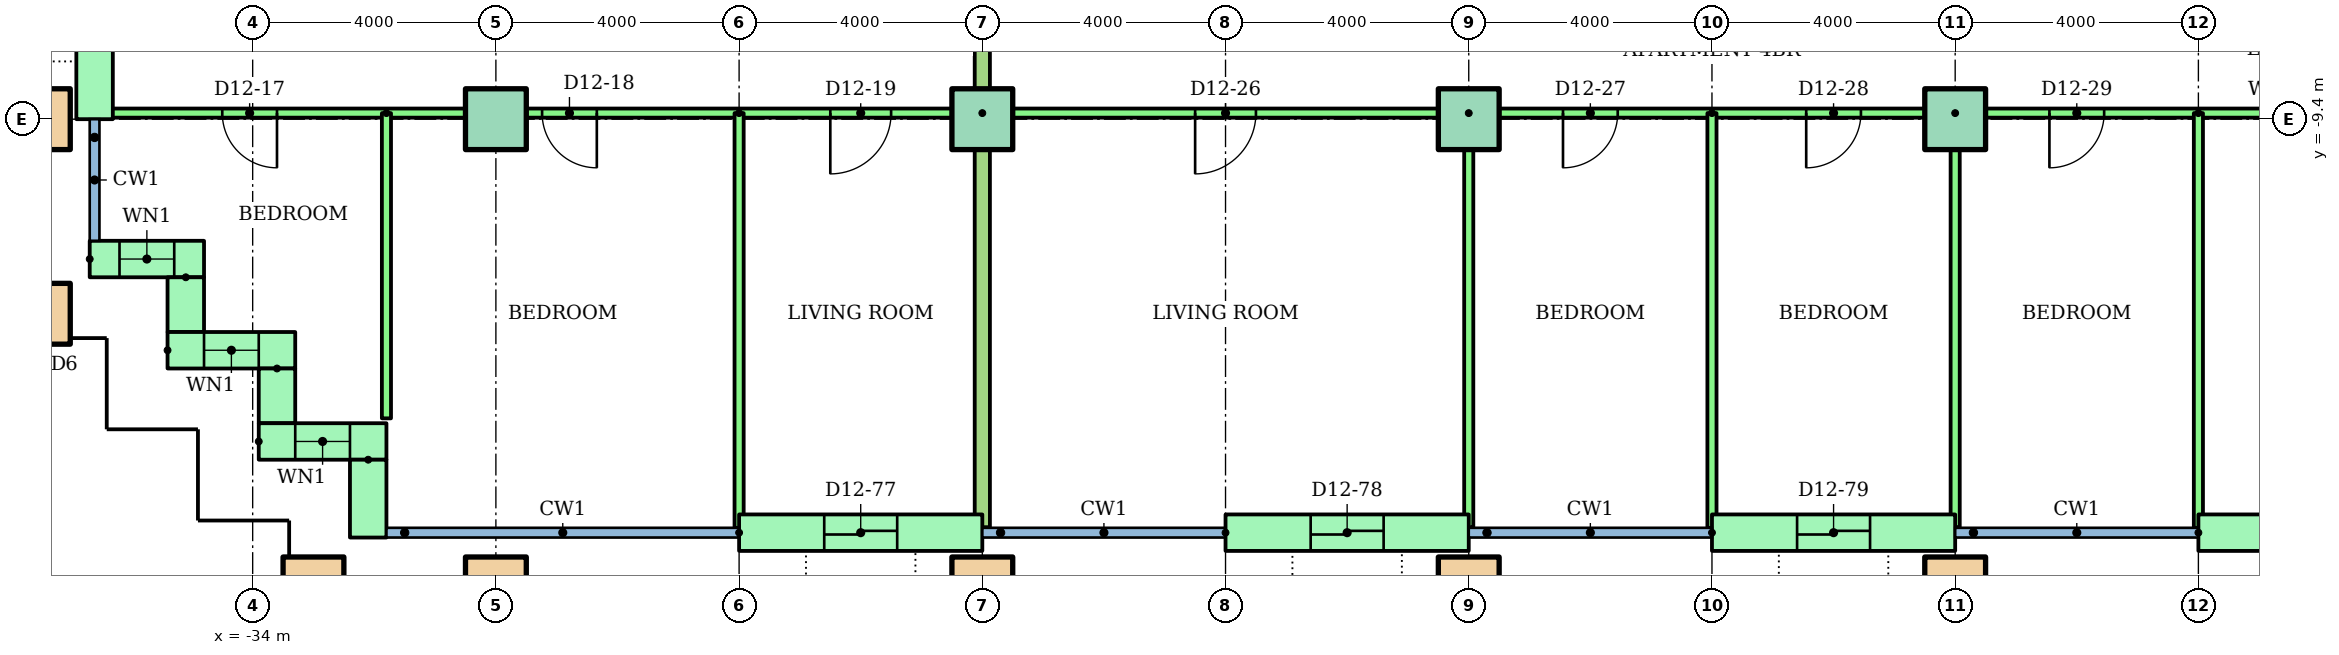
"""IFC4 building model, lengths in metres.
Left out: names, types, materials, properties, quantities, classifications, styles, units other than length and angle.
Written with IfcOpenShell. Run it as: python <this file> out.ifc"""

import sys

from ifc_helpers import new_model, si_unit, direction, frame, frame_2d, origin, origin_2d, place, context, subcontext, project, spatial, rectangle, hollow_rectangle, extrude, element, fill, save


model = new_model("IFC4")
c1 = context("Model", 3, precision=1e-05, world=origin(), true_north=direction((0.0, 1.0)))
c2 = subcontext(c1, "Body", "Model", "MODEL_VIEW")
j1 = project(units=[si_unit("LENGTHUNIT", "METRE"), si_unit("PLANEANGLEUNIT", "RADIAN")], contexts=[c1])
p1 = place(None, origin())
s1 = spatial("IfcSite", under=j1, at=p1, CompositionType="ELEMENT")
p2 = place(p1, origin())
s2 = spatial("IfcBuilding", under=s1, at=p2, CompositionType="ELEMENT")
p3 = place(p2, frame((0.0, 0.0, 48.0)))
s3 = spatial("IfcBuildingStorey", under=s2, at=p3, CompositionType="ELEMENT", Elevation=48.0)
for number, where in (
    (1, (-33.0, -17.1, 0.0)),
    (2, (-30.0, -17.1, 0.0)),
    (3, (-22.0, -17.1, 0.0)),
    (4, (-14.0, -17.1, 0.0)),
    (5, (-6.0, -17.1, 0.0)),
    (6, (-37.5, -12.6, 0.0)),
    (7, (-37.5, -9.4, 0.0)),
):
    element("IfcColumn", number, at=place(p3, frame(where)), inside=s3, PredefinedType="COLUMN", context=c2, shape_type="SweptSolid", body=[
        extrude(hollow_rectangle(XDim=1.0, YDim=1.0, WallThickness=0.05, at=origin_2d()), origin(), (0.0, 0.0, 1.0), 3.2),
    ])
for number, where in (
    (8, (-30.0, -9.4, 0.0)),
    (9, (-22.0, -9.4, 0.0)),
    (10, (-14.0, -9.4, 0.0)),
    (11, (-6.0, -9.4, 0.0)),
):
    element("IfcColumn", number, at=place(p3, frame(where)), inside=s3, PredefinedType="COLUMN", context=c2, shape_type="SweptSolid", body=[
        extrude(rectangle(XDim=1.0, YDim=1.0, at=origin_2d()), origin(), (0.0, 0.0, 1.0), 3.2),
    ])
p4 = place(p3, frame((-36.6, -5.7, 0.0), z_axis=(0.0, 0.0, 1.0), x_axis=(0.0, -1.0, 0.0)))
e12 = element("IfcWall", 12, at=p4, inside=s3, PredefinedType="STANDARD", context=c2, shape_type="SweptSolid", body=[
    extrude(rectangle(XDim=3.7, YDim=0.6, at=frame_2d((1.85, 0.0))), origin(), (0.0, 0.0, 1.0), 2.92),
])
p5 = place(p4, frame((0.725, 0.0, 0.0)))
e13 = element("IfcOpeningElement", 13, at=p5, cuts=e12, PredefinedType="OPENING", context=c2, shape_type="SweptSolid", body=[
    extrude(rectangle(XDim=1.2, YDim=2.1, at=frame_2d((0.6, 1.05))), frame((0.0, 0.31, 0.0), z_axis=(0.0, -1.0, 0.0), x_axis=(1.0, 0.0, 0.0)), (0.0, 0.0, 1.0), 0.62),
])
p6 = place(p3, frame((-36.68, -11.7, 0.0)))
e14 = element("IfcWall", 14, at=p6, inside=s3, PredefinedType="STANDARD", context=c2, shape_type="SweptSolid", body=[
    extrude(rectangle(XDim=1.88, YDim=0.6, at=frame_2d((0.94, 0.0))), origin(), (0.0, 0.0, 1.0), 2.92),
])
p7 = place(p6, frame((0.49, 0.0, 0.9)))
e15 = element("IfcOpeningElement", 15, at=p7, cuts=e14, PredefinedType="OPENING", context=c2, shape_type="SweptSolid", body=[
    extrude(rectangle(XDim=0.9, YDim=1.5, at=frame_2d((0.45, 0.75))), frame((0.0, 0.31, 0.0), z_axis=(0.0, -1.0, 0.0), x_axis=(1.0, 0.0, 0.0)), (0.0, 0.0, 1.0), 0.62),
])
p8 = place(p3, frame((-35.1, -12.0, 0.0), z_axis=(0.0, 0.0, 1.0), x_axis=(0.0, -1.0, 0.0)))
e16 = element("IfcWall", 16, at=p8, inside=s3, PredefinedType="STANDARD", context=c2, shape_type="SweptSolid", body=[
    extrude(rectangle(XDim=0.9, YDim=0.6, at=frame_2d((0.45, 0.0))), origin(), (0.0, 0.0, 1.0), 2.92),
])
p9 = place(p3, frame((-35.4, -13.2, 0.0)))
e17 = element("IfcWall", 17, at=p9, inside=s3, PredefinedType="STANDARD", context=c2, shape_type="SweptSolid", body=[
    extrude(rectangle(XDim=2.1, YDim=0.6, at=frame_2d((1.05, 0.0))), origin(), (0.0, 0.0, 1.0), 2.92),
])
p10 = place(p9, frame((0.6, 0.0, 0.9)))
e18 = element("IfcOpeningElement", 18, at=p10, cuts=e17, PredefinedType="OPENING", context=c2, shape_type="SweptSolid", body=[
    extrude(rectangle(XDim=0.9, YDim=1.5, at=frame_2d((0.45, 0.75))), frame((0.0, 0.31, 0.0), z_axis=(0.0, -1.0, 0.0), x_axis=(1.0, 0.0, 0.0)), (0.0, 0.0, 1.0), 0.62),
])
p11 = place(p3, frame((-33.6, -13.5, 0.0), z_axis=(0.0, 0.0, 1.0), x_axis=(0.0, -1.0, 0.0)))
e19 = element("IfcWall", 19, at=p11, inside=s3, PredefinedType="STANDARD", context=c2, shape_type="SweptSolid", body=[
    extrude(rectangle(XDim=0.9, YDim=0.6, at=frame_2d((0.45, 0.0))), origin(), (0.0, 0.0, 1.0), 2.92),
])
p12 = place(p3, frame((-33.9, -14.7, 0.0)))
e20 = element("IfcWall", 20, at=p12, inside=s3, PredefinedType="STANDARD", context=c2, shape_type="SweptSolid", body=[
    extrude(rectangle(XDim=2.1, YDim=0.6, at=frame_2d((1.05, 0.0))), origin(), (0.0, 0.0, 1.0), 2.92),
])
p13 = place(p12, frame((0.6, 0.0, 0.9)))
e21 = element("IfcOpeningElement", 21, at=p13, cuts=e20, PredefinedType="OPENING", context=c2, shape_type="SweptSolid", body=[
    extrude(rectangle(XDim=0.9, YDim=1.5, at=frame_2d((0.45, 0.75))), frame((0.0, 0.31, 0.0), z_axis=(0.0, -1.0, 0.0), x_axis=(1.0, 0.0, 0.0)), (0.0, 0.0, 1.0), 0.62),
])
p14 = place(p3, frame((-32.1, -15.0, 0.0), z_axis=(0.0, 0.0, 1.0), x_axis=(0.0, -1.0, 0.0)))
e22 = element("IfcWall", 22, at=p14, inside=s3, PredefinedType="STANDARD", context=c2, shape_type="SweptSolid", body=[
    extrude(rectangle(XDim=1.28, YDim=0.6, at=frame_2d((0.64, 0.0))), origin(), (0.0, 0.0, 1.0), 2.92),
])
p15 = place(p3, frame((-26.0, -16.2, 0.0)))
e23 = element("IfcWall", 23, at=p15, inside=s3, PredefinedType="STANDARD", context=c2, shape_type="SweptSolid", body=[
    extrude(rectangle(XDim=4.0, YDim=0.6, at=frame_2d((2.0, 0.0))), origin(), (0.0, 0.0, 1.0), 2.92),
])
p16 = place(p15, frame((1.4, 0.0, 0.0)))
e24 = element("IfcOpeningElement", 24, at=p16, cuts=e23, PredefinedType="OPENING", context=c2, shape_type="SweptSolid", body=[
    extrude(rectangle(XDim=1.2, YDim=2.1, at=frame_2d((0.6, 1.05))), frame((0.0, 0.31, 0.0), z_axis=(0.0, -1.0, 0.0), x_axis=(1.0, 0.0, 0.0)), (0.0, 0.0, 1.0), 0.62),
])
p17 = place(p3, frame((-18.0, -16.2, 0.0)))
e25 = element("IfcWall", 25, at=p17, inside=s3, PredefinedType="STANDARD", context=c2, shape_type="SweptSolid", body=[
    extrude(rectangle(XDim=4.0, YDim=0.6, at=frame_2d((2.0, 0.0))), origin(), (0.0, 0.0, 1.0), 2.92),
])
p18 = place(p17, frame((1.4, 0.0, 0.0)))
e26 = element("IfcOpeningElement", 26, at=p18, cuts=e25, PredefinedType="OPENING", context=c2, shape_type="SweptSolid", body=[
    extrude(rectangle(XDim=1.2, YDim=2.1, at=frame_2d((0.6, 1.05))), frame((0.0, 0.31, 0.0), z_axis=(0.0, -1.0, 0.0), x_axis=(1.0, 0.0, 0.0)), (0.0, 0.0, 1.0), 0.62),
])
p19 = place(p3, frame((-10.0, -16.2, 0.0)))
e27 = element("IfcWall", 27, at=p19, inside=s3, PredefinedType="STANDARD", context=c2, shape_type="SweptSolid", body=[
    extrude(rectangle(XDim=4.0, YDim=0.6, at=frame_2d((2.0, 0.0))), origin(), (0.0, 0.0, 1.0), 2.92),
])
p20 = place(p19, frame((1.4, 0.0, 0.0)))
e28 = element("IfcOpeningElement", 28, at=p20, cuts=e27, PredefinedType="OPENING", context=c2, shape_type="SweptSolid", body=[
    extrude(rectangle(XDim=1.2, YDim=2.1, at=frame_2d((0.6, 1.05))), frame((0.0, 0.31, 0.0), z_axis=(0.0, -1.0, 0.0), x_axis=(1.0, 0.0, 0.0)), (0.0, 0.0, 1.0), 0.62),
])
p21 = place(p3, frame((-2.0, -16.2, 0.0)))
e29 = element("IfcWall", 29, at=p21, inside=s3, PredefinedType="STANDARD", context=c2, shape_type="SweptSolid", body=[
    extrude(rectangle(XDim=4.0, YDim=0.6, at=frame_2d((2.0, 0.0))), origin(), (0.0, 0.0, 1.0), 2.92),
])
p22 = place(p21, frame((1.4, 0.0, 0.0)))
e30 = element("IfcOpeningElement", 30, at=p22, cuts=e29, PredefinedType="OPENING", context=c2, shape_type="SweptSolid", body=[
    extrude(rectangle(XDim=1.2, YDim=2.1, at=frame_2d((0.6, 1.05))), frame((0.0, 0.31, 0.0), z_axis=(0.0, -1.0, 0.0), x_axis=(1.0, 0.0, 0.0)), (0.0, 0.0, 1.0), 0.62),
])
p23 = place(p3, frame((-22.0, -9.3, 0.0), z_axis=(0.0, 0.0, 1.0), x_axis=(-1.0, 0.0, 0.0)))
e31 = element("IfcWall", 31, at=p23, inside=s3, PredefinedType="PARTITIONING", context=c2, shape_type="SweptSolid", body=[
    extrude(rectangle(XDim=14.51, YDim=0.15, at=frame_2d((7.255, 0.0))), origin(), (0.0, 0.0, 1.0), 2.4),
])
p24 = place(p23, frame((11.6, 0.0, 0.0)))
e32 = element("IfcOpeningElement", 32, at=p24, cuts=e31, PredefinedType="OPENING", context=c2, shape_type="SweptSolid", body=[
    extrude(rectangle(XDim=0.9, YDim=2.1, at=frame_2d((0.45, 1.05))), frame((0.0, 0.085, 0.0), z_axis=(0.0, -1.0, 0.0), x_axis=(1.0, 0.0, 0.0)), (0.0, 0.0, 1.0), 0.17),
])
p25 = place(p23, frame((6.34, 0.0, 0.0)))
e33 = element("IfcOpeningElement", 33, at=p25, cuts=e31, PredefinedType="OPENING", context=c2, shape_type="SweptSolid", body=[
    extrude(rectangle(XDim=0.9, YDim=2.1, at=frame_2d((0.45, 1.05))), frame((0.0, 0.085, 0.0), z_axis=(0.0, -1.0, 0.0), x_axis=(1.0, 0.0, 0.0)), (0.0, 0.0, 1.0), 0.17),
])
p26 = place(p23, frame((1.5, 0.0, 0.0)))
e34 = element("IfcOpeningElement", 34, at=p26, cuts=e31, PredefinedType="OPENING", context=c2, shape_type="SweptSolid", body=[
    extrude(rectangle(XDim=1.0, YDim=2.1, at=frame_2d((0.5, 1.05))), frame((0.0, 0.085, 0.0), z_axis=(0.0, -1.0, 0.0), x_axis=(1.0, 0.0, 0.0)), (0.0, 0.0, 1.0), 0.17),
])
p27 = place(p3, frame((-31.8, -9.3, 0.0), z_axis=(0.0, 0.0, 1.0), x_axis=(0.0, -1.0, 0.0)))
e35 = element("IfcWall", 35, at=p27, inside=s3, PredefinedType="PARTITIONING", context=c2, shape_type="SweptSolid", body=[
    extrude(rectangle(XDim=5.02, YDim=0.15, at=frame_2d((2.51, 0.0))), origin(), (0.0, 0.0, 1.0), 2.4),
])
p28 = place(p3, frame((-26.0, -9.3, 0.0), z_axis=(0.0, 0.0, 1.0), x_axis=(0.0, -1.0, 0.0)))
e36 = element("IfcWall", 36, at=p28, inside=s3, PredefinedType="PARTITIONING", context=c2, shape_type="SweptSolid", body=[
    extrude(rectangle(XDim=6.821, YDim=0.15, at=frame_2d((3.411, 0.0))), origin(), (0.0, 0.0, 1.0), 2.4),
])
p29 = place(p3, frame((2.0, -9.3, 0.0), z_axis=(0.0, 0.0, 1.0), x_axis=(-1.0, 0.0, 0.0)))
e37 = element("IfcWall", 37, at=p29, inside=s3, PredefinedType="PARTITIONING", context=c2, shape_type="SweptSolid", body=[
    extrude(rectangle(XDim=24.0, YDim=0.15, at=frame_2d((12.0, 0.0))), origin(), (0.0, 0.0, 1.0), 2.4),
])
p30 = place(p29, frame((19.5, 0.0, 0.0)))
e38 = element("IfcOpeningElement", 38, at=p30, cuts=e37, PredefinedType="OPENING", context=c2, shape_type="SweptSolid", body=[
    extrude(rectangle(XDim=1.0, YDim=2.1, at=frame_2d((0.5, 1.05))), frame((0.0, 0.085, 0.0), z_axis=(0.0, -1.0, 0.0), x_axis=(1.0, 0.0, 0.0)), (0.0, 0.0, 1.0), 0.17),
])
p31 = place(p29, frame((13.55, 0.0, 0.0)))
e39 = element("IfcOpeningElement", 39, at=p31, cuts=e37, PredefinedType="OPENING", context=c2, shape_type="SweptSolid", body=[
    extrude(rectangle(XDim=0.9, YDim=2.1, at=frame_2d((0.45, 1.05))), frame((0.0, 0.085, 0.0), z_axis=(0.0, -1.0, 0.0), x_axis=(1.0, 0.0, 0.0)), (0.0, 0.0, 1.0), 0.17),
])
p32 = place(p29, frame((9.55, 0.0, 0.0)))
e40 = element("IfcOpeningElement", 40, at=p32, cuts=e37, PredefinedType="OPENING", context=c2, shape_type="SweptSolid", body=[
    extrude(rectangle(XDim=0.9, YDim=2.1, at=frame_2d((0.45, 1.05))), frame((0.0, 0.085, 0.0), z_axis=(0.0, -1.0, 0.0), x_axis=(1.0, 0.0, 0.0)), (0.0, 0.0, 1.0), 0.17),
])
p33 = place(p29, frame((5.55, 0.0, 0.0)))
e41 = element("IfcOpeningElement", 41, at=p33, cuts=e37, PredefinedType="OPENING", context=c2, shape_type="SweptSolid", body=[
    extrude(rectangle(XDim=0.9, YDim=2.1, at=frame_2d((0.45, 1.05))), frame((0.0, 0.085, 0.0), z_axis=(0.0, -1.0, 0.0), x_axis=(1.0, 0.0, 0.0)), (0.0, 0.0, 1.0), 0.17),
])
p34 = place(p29, frame((1.55, 0.0, 0.0)))
e42 = element("IfcOpeningElement", 42, at=p34, cuts=e37, PredefinedType="OPENING", context=c2, shape_type="SweptSolid", body=[
    extrude(rectangle(XDim=0.9, YDim=2.1, at=frame_2d((0.45, 1.05))), frame((0.0, 0.085, 0.0), z_axis=(0.0, -1.0, 0.0), x_axis=(1.0, 0.0, 0.0)), (0.0, 0.0, 1.0), 0.17),
])
p35 = place(p3, frame((-14.0, -9.3, 0.0), z_axis=(0.0, 0.0, 1.0), x_axis=(0.0, -1.0, 0.0)))
e43 = element("IfcWall", 43, at=p35, inside=s3, PredefinedType="PARTITIONING", context=c2, shape_type="SweptSolid", body=[
    extrude(rectangle(XDim=6.81, YDim=0.15, at=frame_2d((3.405, 0.0))), origin(), (0.0, 0.0, 1.0), 2.4),
])
p36 = place(p3, frame((-10.0, -9.3, 0.0), z_axis=(0.0, 0.0, 1.0), x_axis=(0.0, -1.0, 0.0)))
e44 = element("IfcWall", 44, at=p36, inside=s3, PredefinedType="PARTITIONING", context=c2, shape_type="SweptSolid", body=[
    extrude(rectangle(XDim=6.821, YDim=0.15, at=frame_2d((3.411, 0.0))), origin(), (0.0, 0.0, 1.0), 2.4),
])
p37 = place(p3, frame((-6.0, -9.3, 0.0), z_axis=(0.0, 0.0, 1.0), x_axis=(0.0, -1.0, 0.0)))
e45 = element("IfcWall", 45, at=p37, inside=s3, PredefinedType="PARTITIONING", context=c2, shape_type="SweptSolid", body=[
    extrude(rectangle(XDim=6.81, YDim=0.15, at=frame_2d((3.405, 0.0))), origin(), (0.0, 0.0, 1.0), 2.4),
])
p38 = place(p3, frame((-2.0, -9.3, 0.0), z_axis=(0.0, 0.0, 1.0), x_axis=(0.0, -1.0, 0.0)))
e46 = element("IfcWall", 46, at=p38, inside=s3, PredefinedType="PARTITIONING", context=c2, shape_type="SweptSolid", body=[
    extrude(rectangle(XDim=6.821, YDim=0.15, at=frame_2d((3.411, 0.0))), origin(), (0.0, 0.0, 1.0), 2.4),
])
p39 = place(p3, frame((-22.0, -1.4, 0.0), z_axis=(0.0, 0.0, 1.0), x_axis=(0.0, -1.0, 0.0)))
e47 = element("IfcWall", 47, at=p39, inside=s3, PredefinedType="PARTITIONING", context=c2, shape_type="SweptSolid", body=[
    extrude(rectangle(XDim=14.71, YDim=0.25, at=frame_2d((7.355, 0.0))), origin(), (0.0, 0.0, 1.0), 2.4),
])
p40 = place(p7, origin())
e48 = element("IfcWindow", 48, at=p40, inside=s3, PartitioningType="SINGLE_PANEL", PredefinedType="WINDOW", context=c2, shape_type="SweptSolid", body=[
    extrude(rectangle(XDim=0.9, YDim=1.5, at=frame_2d((0.45, 0.75))), frame((0.0, 0.03, 0.0), z_axis=(0.0, -1.0, 0.0), x_axis=(1.0, 0.0, 0.0)), (0.0, 0.0, 1.0), 0.06),
])
fill(e15, e48)
p41 = place(p10, origin())
e49 = element("IfcWindow", 49, at=p41, inside=s3, PartitioningType="SINGLE_PANEL", PredefinedType="WINDOW", context=c2, shape_type="SweptSolid", body=[
    extrude(rectangle(XDim=0.9, YDim=1.5, at=frame_2d((0.45, 0.75))), frame((0.0, 0.03, 0.0), z_axis=(0.0, -1.0, 0.0), x_axis=(1.0, 0.0, 0.0)), (0.0, 0.0, 1.0), 0.06),
])
fill(e18, e49)
p42 = place(p13, origin())
e50 = element("IfcWindow", 50, at=p42, inside=s3, PartitioningType="SINGLE_PANEL", PredefinedType="WINDOW", context=c2, shape_type="SweptSolid", body=[
    extrude(rectangle(XDim=0.9, YDim=1.5, at=frame_2d((0.45, 0.75))), frame((0.0, 0.03, 0.0), z_axis=(0.0, -1.0, 0.0), x_axis=(1.0, 0.0, 0.0)), (0.0, 0.0, 1.0), 0.06),
])
fill(e21, e50)
p43 = place(p24, origin())
e51 = element("IfcDoor", 51, at=p43, inside=s3, OperationType="SINGLE_SWING_LEFT", PredefinedType="DOOR", context=c2, shape_type="SweptSolid", body=[
    extrude(rectangle(XDim=0.9, YDim=2.1, at=frame_2d((0.45, 1.05))), frame((0.0, 0.025, 0.0), z_axis=(0.0, -1.0, 0.0), x_axis=(1.0, 0.0, 0.0)), (0.0, 0.0, 1.0), 0.05),
])
fill(e32, e51)
p44 = place(p25, origin())
e52 = element("IfcDoor", 52, at=p44, inside=s3, OperationType="SINGLE_SWING_LEFT", PredefinedType="DOOR", context=c2, shape_type="SweptSolid", body=[
    extrude(rectangle(XDim=0.9, YDim=2.1, at=frame_2d((0.45, 1.05))), frame((0.0, 0.025, 0.0), z_axis=(0.0, -1.0, 0.0), x_axis=(1.0, 0.0, 0.0)), (0.0, 0.0, 1.0), 0.05),
])
fill(e33, e52)
p45 = place(p26, origin())
e53 = element("IfcDoor", 53, at=p45, inside=s3, OperationType="SINGLE_SWING_RIGHT", PredefinedType="DOOR", context=c2, shape_type="SweptSolid", body=[
    extrude(rectangle(XDim=1.0, YDim=2.1, at=frame_2d((0.5, 1.05))), frame((0.0, 0.025, 0.0), z_axis=(0.0, -1.0, 0.0), x_axis=(1.0, 0.0, 0.0)), (0.0, 0.0, 1.0), 0.05),
])
fill(e34, e53)
p46 = place(p30, origin())
e54 = element("IfcDoor", 54, at=p46, inside=s3, OperationType="SINGLE_SWING_RIGHT", PredefinedType="DOOR", context=c2, shape_type="SweptSolid", body=[
    extrude(rectangle(XDim=1.0, YDim=2.1, at=frame_2d((0.5, 1.05))), frame((0.0, 0.025, 0.0), z_axis=(0.0, -1.0, 0.0), x_axis=(1.0, 0.0, 0.0)), (0.0, 0.0, 1.0), 0.05),
])
fill(e38, e54)
p47 = place(p31, origin())
e55 = element("IfcDoor", 55, at=p47, inside=s3, OperationType="SINGLE_SWING_RIGHT", PredefinedType="DOOR", context=c2, shape_type="SweptSolid", body=[
    extrude(rectangle(XDim=0.9, YDim=2.1, at=frame_2d((0.45, 1.05))), frame((0.0, 0.025, 0.0), z_axis=(0.0, -1.0, 0.0), x_axis=(1.0, 0.0, 0.0)), (0.0, 0.0, 1.0), 0.05),
])
fill(e39, e55)
p48 = place(p32, origin())
e56 = element("IfcDoor", 56, at=p48, inside=s3, OperationType="SINGLE_SWING_RIGHT", PredefinedType="DOOR", context=c2, shape_type="SweptSolid", body=[
    extrude(rectangle(XDim=0.9, YDim=2.1, at=frame_2d((0.45, 1.05))), frame((0.0, 0.025, 0.0), z_axis=(0.0, -1.0, 0.0), x_axis=(1.0, 0.0, 0.0)), (0.0, 0.0, 1.0), 0.05),
])
fill(e40, e56)
p49 = place(p33, origin())
e57 = element("IfcDoor", 57, at=p49, inside=s3, OperationType="SINGLE_SWING_RIGHT", PredefinedType="DOOR", context=c2, shape_type="SweptSolid", body=[
    extrude(rectangle(XDim=0.9, YDim=2.1, at=frame_2d((0.45, 1.05))), frame((0.0, 0.025, 0.0), z_axis=(0.0, -1.0, 0.0), x_axis=(1.0, 0.0, 0.0)), (0.0, 0.0, 1.0), 0.05),
])
fill(e41, e57)
p50 = place(p16, origin())
e58 = element("IfcDoor", 58, at=p50, inside=s3, OperationType="SLIDING_TO_LEFT", PredefinedType="DOOR", context=c2, shape_type="SweptSolid", body=[
    extrude(rectangle(XDim=1.2, YDim=2.1, at=frame_2d((0.6, 1.05))), frame((0.0, 0.025, 0.0), z_axis=(0.0, -1.0, 0.0), x_axis=(1.0, 0.0, 0.0)), (0.0, 0.0, 1.0), 0.05),
])
fill(e24, e58)
p51 = place(p18, origin())
e59 = element("IfcDoor", 59, at=p51, inside=s3, OperationType="SLIDING_TO_LEFT", PredefinedType="DOOR", context=c2, shape_type="SweptSolid", body=[
    extrude(rectangle(XDim=1.2, YDim=2.1, at=frame_2d((0.6, 1.05))), frame((0.0, 0.025, 0.0), z_axis=(0.0, -1.0, 0.0), x_axis=(1.0, 0.0, 0.0)), (0.0, 0.0, 1.0), 0.05),
])
fill(e26, e59)
p52 = place(p20, origin())
e60 = element("IfcDoor", 60, at=p52, inside=s3, OperationType="SLIDING_TO_LEFT", PredefinedType="DOOR", context=c2, shape_type="SweptSolid", body=[
    extrude(rectangle(XDim=1.2, YDim=2.1, at=frame_2d((0.6, 1.05))), frame((0.0, 0.025, 0.0), z_axis=(0.0, -1.0, 0.0), x_axis=(1.0, 0.0, 0.0)), (0.0, 0.0, 1.0), 0.05),
])
fill(e28, e60)
save(model, sys.argv[1])
